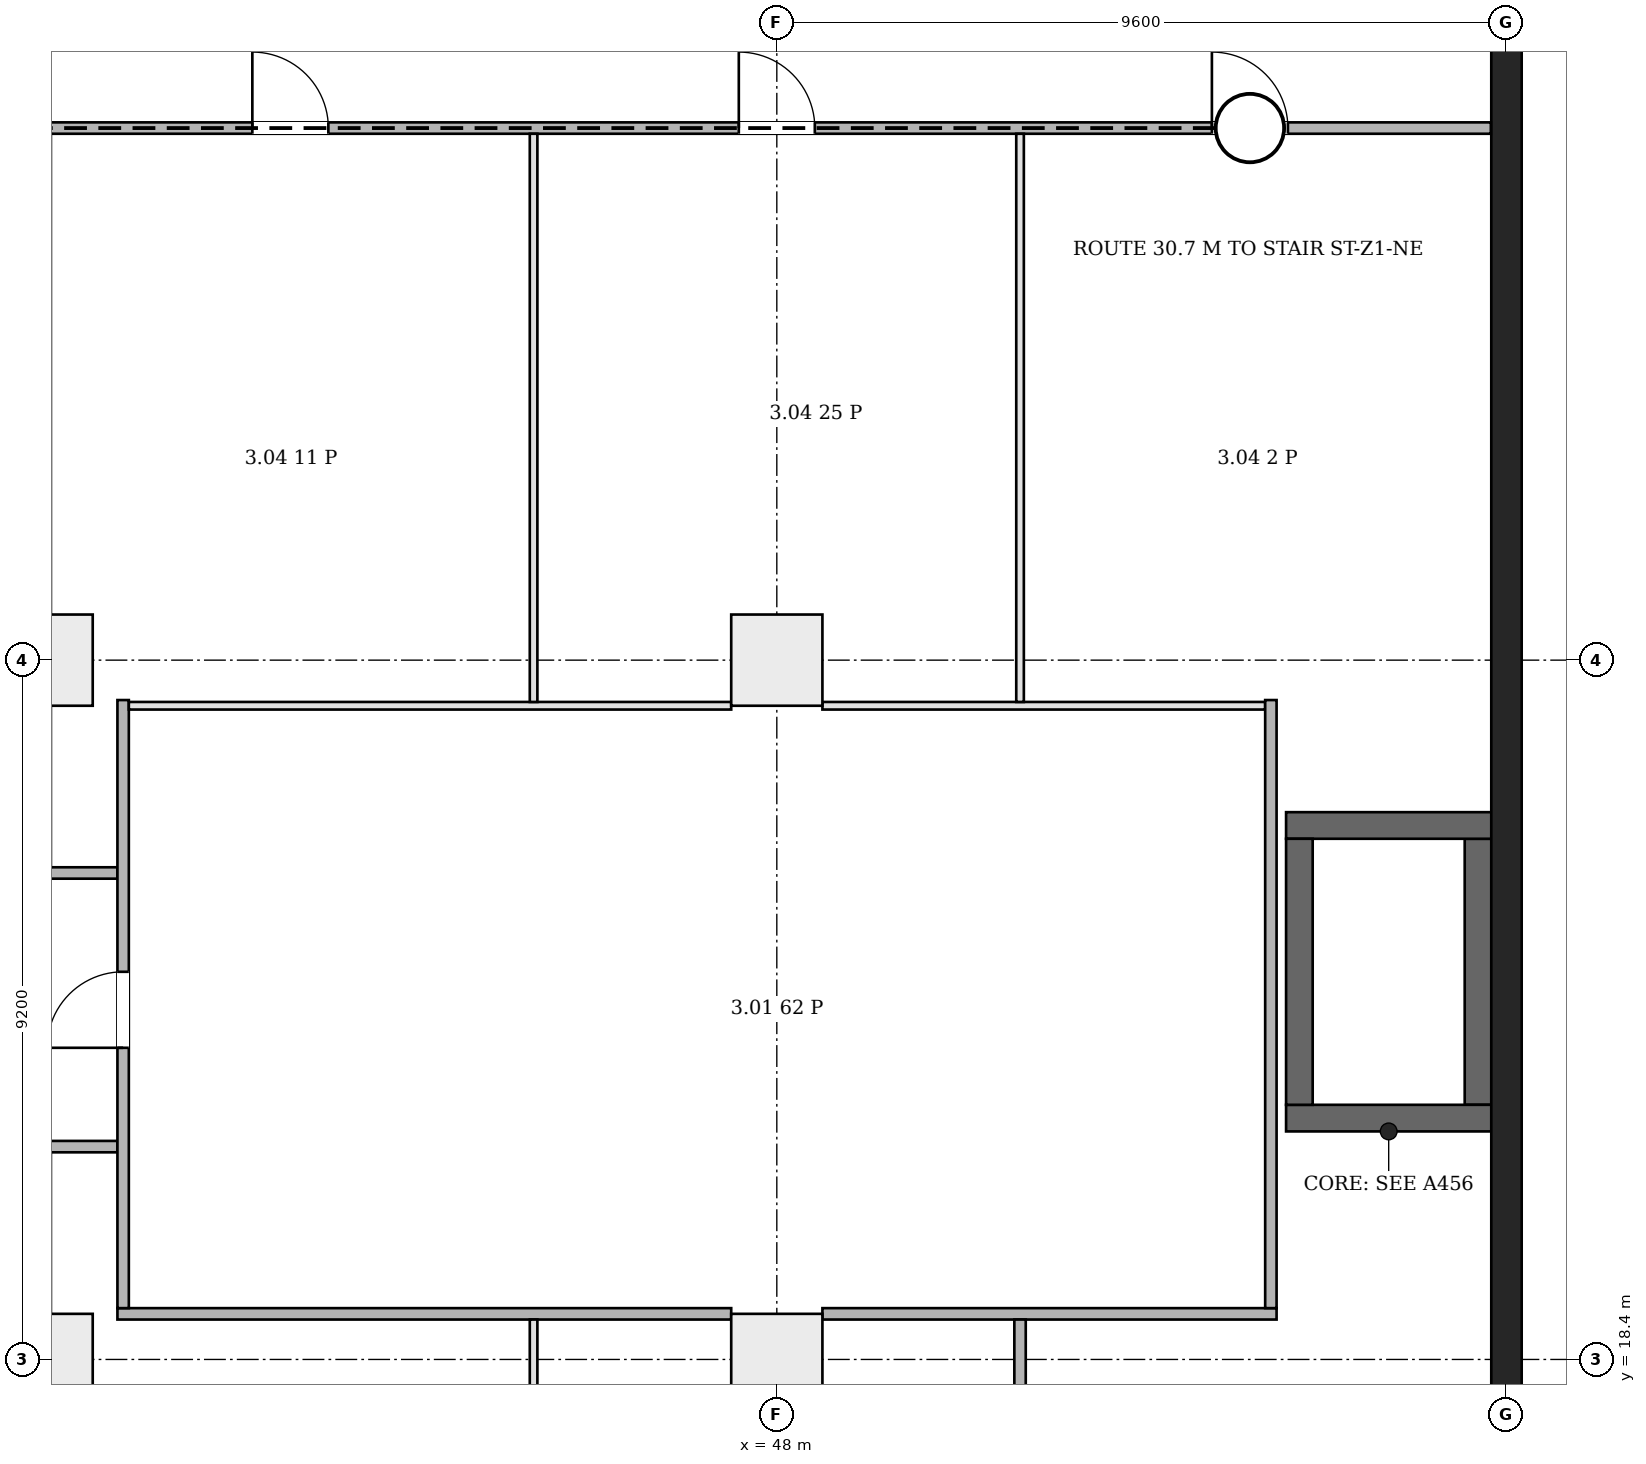
"""IFC4 building model, lengths in metres.
Left out: names, types, materials, properties, quantities, classifications, styles, units other than length and angle.
Written with IfcOpenShell. Run it as: python <this file> out.ifc"""

import sys

from ifc_helpers import new_model, si_unit, direction, frame, frame_2d, origin, origin_2d, place, context, subcontext, project, spatial, rectangle, extrude, element, fill, save


model = new_model("IFC4")
c1 = context("Model", 3, precision=1e-05, world=origin(), true_north=direction((0.0, 1.0)))
c2 = subcontext(c1, "Body", "Model", "MODEL_VIEW")
j1 = project(units=[si_unit("LENGTHUNIT", "METRE"), si_unit("PLANEANGLEUNIT", "RADIAN")], contexts=[c1])
p1 = place(None, origin())
s1 = spatial("IfcSite", under=j1, at=p1, CompositionType="ELEMENT")
p2 = place(p1, origin())
s2 = spatial("IfcBuilding", under=s1, at=p2, CompositionType="ELEMENT")
p3 = place(p2, frame((0.0, 0.0, 21.7)))
s3 = spatial("IfcBuildingStorey", under=s2, at=p3, CompositionType="ELEMENT", Elevation=21.7)
p4 = place(p3, frame((57.6, -0.2, 0.0), z_axis=(0.0, 0.0, 1.0), x_axis=(0.0, 1.0, 0.0)))
e1 = element("IfcWall", 1, at=p4, inside=s3, PredefinedType="SHEAR", context=c2, shape_type="SweptSolid", body=[
    extrude(rectangle(XDim=46.88, YDim=0.4, at=frame_2d((23.44, 0.0))), origin(), (0.0, 0.0, 1.0), 5.0),
])
for number, where, z_axis, x_axis in (
    (2, (54.7, 21.575, 0.0), (0.0, 0.0, 1.0), (1.0, 0.0, 0.0)),
    (3, (54.7, 25.425, 0.0), (0.0, 0.0, 1.0), (1.0, 0.0, 0.0)),
):
    element("IfcWall", number, at=place(p3, frame(where, z_axis=z_axis, x_axis=x_axis)), inside=s3, PredefinedType="SHEAR", context=c2, shape_type="SweptSolid", body=[
        extrude(rectangle(XDim=2.7, YDim=0.35, at=frame_2d((1.35, 0.0))), origin(), (0.0, 0.0, 1.0), 5.0),
    ])
for number, where, z_axis, x_axis in (
    (4, (54.875, 21.75, 0.0), (0.0, 0.0, 1.0), (0.0, 1.0, 0.0)),
    (5, (57.225, 21.75, 0.0), (0.0, 0.0, 1.0), (0.0, 1.0, 0.0)),
):
    element("IfcWall", number, at=place(p3, frame(where, z_axis=z_axis, x_axis=x_axis)), inside=s3, PredefinedType="SHEAR", context=c2, shape_type="SweptSolid", body=[
        extrude(rectangle(XDim=3.5, YDim=0.35, at=frame_2d((1.75, 0.0))), origin(), (0.0, 0.0, 1.0), 5.0),
    ])
for number, where, z_axis, x_axis in (
    (6, (38.4, 18.4, 0.0), (0.0, 0.0, 1.0), (1.0, 0.0, 0.0)),
    (7, (48.0, 18.4, 0.0), (0.0, 0.0, 1.0), (1.0, 0.0, 0.0)),
    (8, (38.4, 27.6, 0.0), (0.0, 0.0, 1.0), (1.0, 0.0, 0.0)),
    (9, (48.0, 27.6, 0.0), (0.0, 0.0, 1.0), (1.0, 0.0, 0.0)),
):
    element("IfcColumn", number, at=place(p3, frame(where, z_axis=z_axis, x_axis=x_axis)), inside=s3, PredefinedType="COLUMN", context=c2, shape_type="SweptSolid", body=[
        extrude(rectangle(XDim=1.2, YDim=1.2, at=origin_2d()), origin(), (0.0, 0.0, 1.0), 5.0),
    ])
p5 = place(p3, frame((0.206, 24.8, 0.0), z_axis=(0.0, 0.0, 1.0), x_axis=(1.0, 0.0, 0.0)))
e10 = element("IfcWall", 10, at=p5, inside=s3, PredefinedType="PARTITIONING", context=c2, shape_type="SweptSolid", body=[
    extrude(rectangle(XDim=39.119, YDim=0.15, at=frame_2d((19.56, 0.0))), origin(), (0.0, 0.0, 1.0), 4.65),
])
p6 = place(p5, frame((15.294, 0.0, 0.0)))
e11 = element("IfcOpeningElement", 11, at=p6, cuts=e10, PredefinedType="OPENING", context=c2, shape_type="SweptSolid", body=[
    extrude(rectangle(XDim=1.0, YDim=2.1, at=frame_2d((0.5, 1.05))), frame((0.0, 0.085, 0.0), z_axis=(0.0, -1.0, 0.0), x_axis=(1.0, 0.0, 0.0)), (0.0, 0.0, 1.0), 0.17),
])
p7 = place(p5, frame((21.694, 0.0, 0.0)))
e12 = element("IfcOpeningElement", 12, at=p7, cuts=e10, PredefinedType="OPENING", context=c2, shape_type="SweptSolid", body=[
    extrude(rectangle(XDim=1.0, YDim=2.1, at=frame_2d((0.5, 1.05))), frame((0.0, 0.085, 0.0), z_axis=(0.0, -1.0, 0.0), x_axis=(1.0, 0.0, 0.0)), (0.0, 0.0, 1.0), 0.17),
])
p8 = place(p5, frame((28.094, 0.0, 0.0)))
e13 = element("IfcOpeningElement", 13, at=p8, cuts=e10, PredefinedType="OPENING", context=c2, shape_type="SweptSolid", body=[
    extrude(rectangle(XDim=1.0, YDim=2.1, at=frame_2d((0.5, 1.05))), frame((0.0, 0.085, 0.0), z_axis=(0.0, -1.0, 0.0), x_axis=(1.0, 0.0, 0.0)), (0.0, 0.0, 1.0), 0.17),
])
p9 = place(p3, frame((29.075, 21.2, 0.0), z_axis=(0.0, 0.0, 1.0), x_axis=(1.0, 0.0, 0.0)))
e14 = element("IfcWall", 14, at=p9, inside=s3, PredefinedType="PARTITIONING", context=c2, shape_type="SweptSolid", body=[
    extrude(rectangle(XDim=10.25, YDim=0.15, at=frame_2d((5.125, 0.0))), origin(), (0.0, 0.0, 1.0), 4.65),
])
p10 = place(p9, frame((1.035, 0.0, 0.0)))
e15 = element("IfcOpeningElement", 15, at=p10, cuts=e14, PredefinedType="OPENING", context=c2, shape_type="SweptSolid", body=[
    extrude(rectangle(XDim=1.0, YDim=2.1, at=frame_2d((0.5, 1.05))), frame((0.0, 0.085, 0.0), z_axis=(0.0, -1.0, 0.0), x_axis=(1.0, 0.0, 0.0)), (0.0, 0.0, 1.0), 0.17),
])
p11 = place(p9, frame((5.625, 0.0, 0.0)))
e16 = element("IfcOpeningElement", 16, at=p11, cuts=e14, PredefinedType="OPENING", context=c2, shape_type="SweptSolid", body=[
    extrude(rectangle(XDim=1.0, YDim=2.1, at=frame_2d((0.5, 1.05))), frame((0.0, 0.085, 0.0), z_axis=(0.0, -1.0, 0.0), x_axis=(1.0, 0.0, 0.0)), (0.0, 0.0, 1.0), 0.17),
])
p12 = place(p3, frame((35.406, 34.6, 0.0), z_axis=(0.0, 0.0, 1.0), x_axis=(1.0, 0.0, 0.0)))
e17 = element("IfcWall", 17, at=p12, inside=s3, PredefinedType="PARTITIONING", context=c2, shape_type="SweptSolid", body=[
    extrude(rectangle(XDim=21.988, YDim=0.15, at=frame_2d((10.994, 0.0))), origin(), (0.0, 0.0, 1.0), 4.65),
])
p13 = place(p12, frame((1.069, 0.0, 0.0)))
e18 = element("IfcOpeningElement", 18, at=p13, cuts=e17, PredefinedType="OPENING", context=c2, shape_type="SweptSolid", body=[
    extrude(rectangle(XDim=1.0, YDim=2.1, at=frame_2d((0.5, 1.05))), frame((0.0, 0.085, 0.0), z_axis=(0.0, -1.0, 0.0), x_axis=(1.0, 0.0, 0.0)), (0.0, 0.0, 1.0), 0.17),
])
p14 = place(p12, frame((5.694, 0.0, 0.0)))
e19 = element("IfcOpeningElement", 19, at=p14, cuts=e17, PredefinedType="OPENING", context=c2, shape_type="SweptSolid", body=[
    extrude(rectangle(XDim=1.0, YDim=2.1, at=frame_2d((0.5, 1.05))), frame((0.0, 0.085, 0.0), z_axis=(0.0, -1.0, 0.0), x_axis=(1.0, 0.0, 0.0)), (0.0, 0.0, 1.0), 0.17),
])
p15 = place(p12, frame((12.094, 0.0, 0.0)))
e20 = element("IfcOpeningElement", 20, at=p15, cuts=e17, PredefinedType="OPENING", context=c2, shape_type="SweptSolid", body=[
    extrude(rectangle(XDim=1.0, YDim=2.1, at=frame_2d((0.5, 1.05))), frame((0.0, 0.085, 0.0), z_axis=(0.0, -1.0, 0.0), x_axis=(1.0, 0.0, 0.0)), (0.0, 0.0, 1.0), 0.17),
])
p16 = place(p12, frame((18.318, 0.0, 0.0)))
e21 = element("IfcOpeningElement", 21, at=p16, cuts=e17, PredefinedType="OPENING", context=c2, shape_type="SweptSolid", body=[
    extrude(rectangle(XDim=1.0, YDim=2.1, at=frame_2d((0.5, 1.05))), frame((0.0, 0.085, 0.0), z_axis=(0.0, -1.0, 0.0), x_axis=(1.0, 0.0, 0.0)), (0.0, 0.0, 1.0), 0.17),
])
p17 = place(p3, frame((39.325, 19.0, 0.0), z_axis=(0.0, 0.0, 1.0), x_axis=(1.0, 0.0, 0.0)))
e22 = element("IfcWall", 22, at=p17, inside=s3, PredefinedType="PARTITIONING", context=c2, shape_type="SweptSolid", body=[
    extrude(rectangle(XDim=8.075, YDim=0.15, at=frame_2d((4.038, 0.0))), origin(), (0.0, 0.0, 1.0), 4.65),
])
p18 = place(p3, frame((39.4, 19.075, 0.0), z_axis=(0.0, 0.0, 1.0), x_axis=(0.0, 1.0, 0.0)))
e23 = element("IfcWall", 23, at=p18, inside=s3, PredefinedType="PARTITIONING", context=c2, shape_type="SweptSolid", body=[
    extrude(rectangle(XDim=8.0, YDim=0.15, at=frame_2d((4.0, 0.0))), origin(), (0.0, 0.0, 1.0), 4.65),
])
p19 = place(p18, frame((3.425, 0.0, 0.0)))
e24 = element("IfcOpeningElement", 24, at=p19, cuts=e23, PredefinedType="OPENING", context=c2, shape_type="SweptSolid", body=[
    extrude(rectangle(XDim=1.0, YDim=2.1, at=frame_2d((0.5, 1.05))), frame((0.0, 0.085, 0.0), z_axis=(0.0, -1.0, 0.0), x_axis=(1.0, 0.0, 0.0)), (0.0, 0.0, 1.0), 0.17),
])
p20 = place(p3, frame((39.475, 27.0, 0.0), z_axis=(0.0, 0.0, 1.0), x_axis=(1.0, 0.0, 0.0)))
e25 = element("IfcWall", 25, at=p20, inside=s3, PredefinedType="PARTITIONING", context=c2, shape_type="SweptSolid", body=[
    extrude(rectangle(XDim=7.925, YDim=0.1, at=frame_2d((3.962, 0.0))), origin(), (0.0, 0.0, 1.0), 4.65),
])
p21 = place(p3, frame((44.8, 11.575, 0.0), z_axis=(0.0, 0.0, 1.0), x_axis=(0.0, 1.0, 0.0)))
e26 = element("IfcWall", 26, at=p21, inside=s3, PredefinedType="PARTITIONING", context=c2, shape_type="SweptSolid", body=[
    extrude(rectangle(XDim=7.35, YDim=0.1, at=frame_2d((3.675, 0.0))), origin(), (0.0, 0.0, 1.0), 4.65),
])
p22 = place(p3, frame((44.8, 27.05, 0.0), z_axis=(0.0, 0.0, 1.0), x_axis=(0.0, 1.0, 0.0)))
e27 = element("IfcWall", 27, at=p22, inside=s3, PredefinedType="PARTITIONING", context=c2, shape_type="SweptSolid", body=[
    extrude(rectangle(XDim=7.475, YDim=0.1, at=frame_2d((3.737, 0.0))), origin(), (0.0, 0.0, 1.0), 4.65),
])
p23 = place(p3, frame((48.6, 19.0, 0.0), z_axis=(0.0, 0.0, 1.0), x_axis=(1.0, 0.0, 0.0)))
e28 = element("IfcWall", 28, at=p23, inside=s3, PredefinedType="PARTITIONING", context=c2, shape_type="SweptSolid", body=[
    extrude(rectangle(XDim=5.975, YDim=0.15, at=frame_2d((2.987, 0.0))), origin(), (0.0, 0.0, 1.0), 4.65),
])
p24 = place(p3, frame((48.6, 27.0, 0.0), z_axis=(0.0, 0.0, 1.0), x_axis=(1.0, 0.0, 0.0)))
e29 = element("IfcWall", 29, at=p24, inside=s3, PredefinedType="PARTITIONING", context=c2, shape_type="SweptSolid", body=[
    extrude(rectangle(XDim=5.825, YDim=0.1, at=frame_2d((2.913, 0.0))), origin(), (0.0, 0.0, 1.0), 4.65),
])
p25 = place(p3, frame((51.2, 11.575, 0.0), z_axis=(0.0, 0.0, 1.0), x_axis=(0.0, 1.0, 0.0)))
e30 = element("IfcWall", 30, at=p25, inside=s3, PredefinedType="PARTITIONING", context=c2, shape_type="SweptSolid", body=[
    extrude(rectangle(XDim=7.35, YDim=0.15, at=frame_2d((3.675, 0.0))), origin(), (0.0, 0.0, 1.0), 4.65),
])
p26 = place(p3, frame((51.2, 27.05, 0.0), z_axis=(0.0, 0.0, 1.0), x_axis=(0.0, 1.0, 0.0)))
e31 = element("IfcWall", 31, at=p26, inside=s3, PredefinedType="PARTITIONING", context=c2, shape_type="SweptSolid", body=[
    extrude(rectangle(XDim=7.475, YDim=0.1, at=frame_2d((3.737, 0.0))), origin(), (0.0, 0.0, 1.0), 4.65),
])
p27 = place(p3, frame((54.5, 19.075, 0.0), z_axis=(0.0, 0.0, 1.0), x_axis=(0.0, 1.0, 0.0)))
e32 = element("IfcWall", 32, at=p27, inside=s3, PredefinedType="PARTITIONING", context=c2, shape_type="SweptSolid", body=[
    extrude(rectangle(XDim=8.0, YDim=0.15, at=frame_2d((4.0, 0.0))), origin(), (0.0, 0.0, 1.0), 4.65),
])
p28 = place(p14, origin())
e33 = element("IfcDoor", 33, at=p28, inside=s3, OperationType="SINGLE_SWING_RIGHT", PredefinedType="DOOR", context=c2, shape_type="SweptSolid", body=[
    extrude(rectangle(XDim=1.0, YDim=2.1, at=frame_2d((0.5, 1.05))), frame((0.0, 0.025, 0.0), z_axis=(0.0, -1.0, 0.0), x_axis=(1.0, 0.0, 0.0)), (0.0, 0.0, 1.0), 0.05),
])
fill(e19, e33)
p29 = place(p15, origin())
e34 = element("IfcDoor", 34, at=p29, inside=s3, OperationType="SINGLE_SWING_LEFT", PredefinedType="DOOR", context=c2, shape_type="SweptSolid", body=[
    extrude(rectangle(XDim=1.0, YDim=2.1, at=frame_2d((0.5, 1.05))), frame((0.0, 0.025, 0.0), z_axis=(0.0, -1.0, 0.0), x_axis=(1.0, 0.0, 0.0)), (0.0, 0.0, 1.0), 0.05),
])
fill(e20, e34)
p30 = place(p16, origin())
e35 = element("IfcDoor", 35, at=p30, inside=s3, OperationType="SINGLE_SWING_LEFT", PredefinedType="DOOR", context=c2, shape_type="SweptSolid", body=[
    extrude(rectangle(XDim=1.0, YDim=2.1, at=frame_2d((0.5, 1.05))), frame((0.0, 0.025, 0.0), z_axis=(0.0, -1.0, 0.0), x_axis=(1.0, 0.0, 0.0)), (0.0, 0.0, 1.0), 0.05),
])
fill(e21, e35)
p31 = place(p19, origin())
e36 = element("IfcDoor", 36, at=p31, inside=s3, OperationType="SINGLE_SWING_LEFT", PredefinedType="DOOR", context=c2, shape_type="SweptSolid", body=[
    extrude(rectangle(XDim=1.0, YDim=2.1, at=frame_2d((0.5, 1.05))), frame((0.0, 0.025, 0.0), z_axis=(0.0, -1.0, 0.0), x_axis=(1.0, 0.0, 0.0)), (0.0, 0.0, 1.0), 0.05),
])
fill(e24, e36)
save(model, sys.argv[1])
